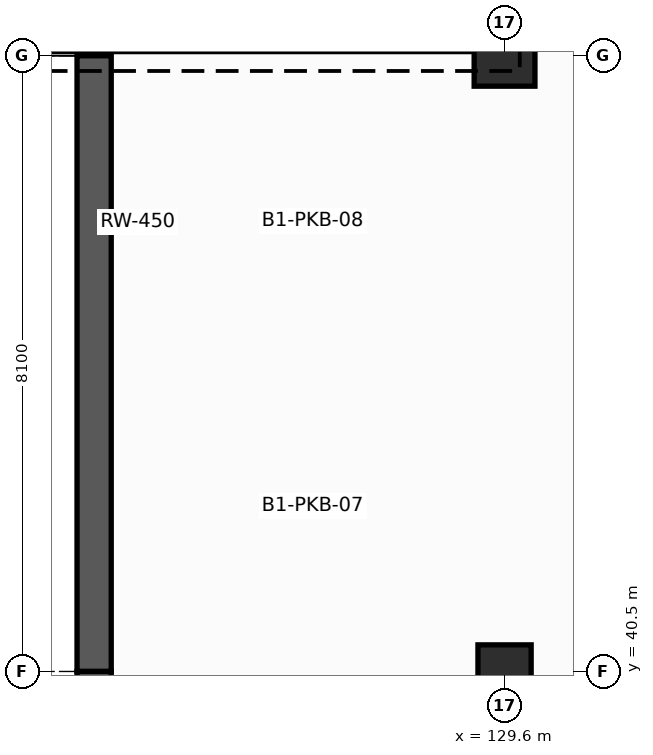
"""IFC4 building model, lengths in metres.
Left out: names, types, materials, properties, quantities, classifications, styles, units other than length and angle.
Written with IfcOpenShell. Run it as: python <this file> out.ifc"""

import sys

from ifc_helpers import new_model, si_unit, direction, frame, frame_2d, origin, origin_2d, place, context, subcontext, project, spatial, rectangle, extrude, element, save


model = new_model("IFC4")
c1 = context("Model", 3, precision=1e-05, world=origin(), true_north=direction((0.0, 1.0)))
c2 = subcontext(c1, "Body", "Model", "MODEL_VIEW")
j1 = project(units=[si_unit("LENGTHUNIT", "METRE"), si_unit("PLANEANGLEUNIT", "RADIAN")], contexts=[c1])
p1 = place(None, origin())
s1 = spatial("IfcSite", under=j1, at=p1, CompositionType="ELEMENT")
p2 = place(p1, origin())
s2 = spatial("IfcBuilding", under=s1, at=p2, CompositionType="ELEMENT")
p3 = place(p2, frame((0.0, 0.0, -5.4)))
s3 = spatial("IfcBuildingStorey", under=s2, at=p3, CompositionType="ELEMENT", Elevation=-5.4)
p4 = place(p3, frame((129.6, 40.5, -0.4), z_axis=(0.0, 0.0, 1.0), x_axis=(1.0, 0.0, 0.0)))
e1 = element("IfcColumn", 1, at=p4, inside=s3, PredefinedType="COLUMN", context=c2, shape_type="SweptSolid", body=[
    extrude(rectangle(XDim=0.7, YDim=0.7, at=origin_2d()), origin(), (0.0, 0.0, 1.0), 5.8),
])
p5 = place(p3, frame((129.6, 48.6, -0.4), z_axis=(0.0, 0.0, 1.0), x_axis=(1.0, 0.0, 0.0)))
e2 = element("IfcColumn", 2, at=p5, inside=s3, PredefinedType="COLUMN", context=c2, shape_type="SweptSolid", body=[
    extrude(rectangle(XDim=0.8, YDim=0.8, at=origin_2d()), origin(), (0.0, 0.0, 1.0), 5.8),
])
for number, where, z_axis, x_axis in (
    (3, (124.2, 48.6, 0.0), (0.0, 0.0, 1.0), (0.0, -1.0, 0.0)),
    (4, (124.2, 40.5, 0.0), (0.0, 0.0, 1.0), (0.0, -1.0, 0.0)),
):
    element("IfcWall", number, at=place(p3, frame(where, z_axis=z_axis, x_axis=x_axis)), inside=s3, PredefinedType="USERDEFINED", context=c2, shape_type="SweptSolid", body=[
        extrude(rectangle(XDim=8.1, YDim=0.45, at=frame_2d((4.05, 0.0))), origin(), (0.0, 0.0, 1.0), 5.1),
    ])
save(model, sys.argv[1])
